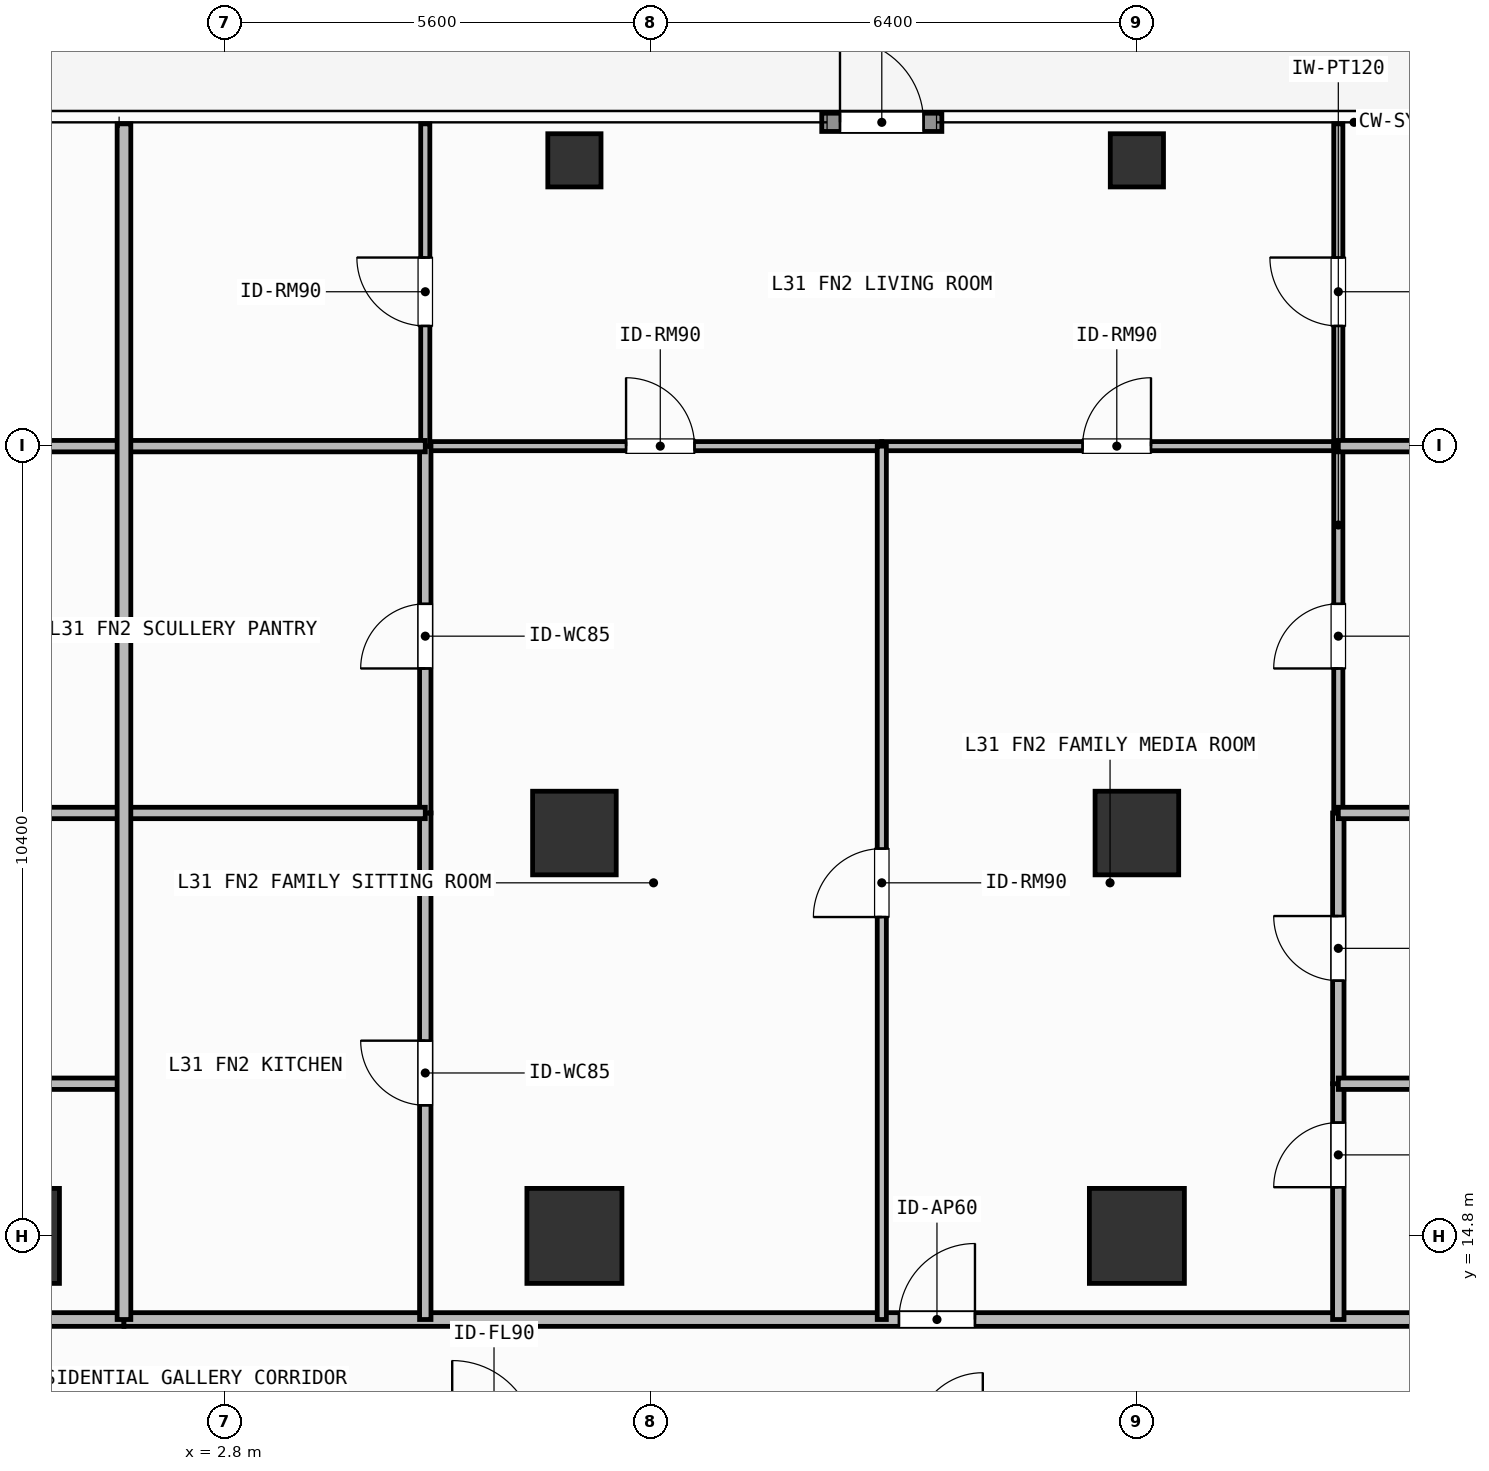
"""IFC4 building model, lengths in metres.
Left out: names, types, materials, properties, quantities, classifications, styles, units other than length and angle.
Written with IfcOpenShell. Run it as: python <this file> out.ifc"""

import sys

from ifc_helpers import new_model, si_unit, direction, frame, frame_2d, origin, origin_2d, place, context, subcontext, project, spatial, rectangle, hollow_rectangle, extrude, element, fill, save


model = new_model("IFC4")
c1 = context("Model", 3, precision=1e-05, world=origin(), true_north=direction((0.0, 1.0)))
c2 = subcontext(c1, "Body", "Model", "MODEL_VIEW")
j1 = project(units=[si_unit("LENGTHUNIT", "METRE"), si_unit("PLANEANGLEUNIT", "RADIAN")], contexts=[c1])
p1 = place(None, origin())
s1 = spatial("IfcSite", under=j1, at=p1, CompositionType="ELEMENT")
p2 = place(p1, origin())
s2 = spatial("IfcBuilding", under=s1, at=p2, CompositionType="ELEMENT")
p3 = place(p2, frame((0.0, 0.0, 125.1)))
s3 = spatial("IfcBuildingStorey", under=s2, at=p3, CompositionType="ELEMENT", Elevation=125.1)
for number, where, z_axis, x_axis in (
    (1, (0.0, 14.8, 0.0), (0.0, 0.0, 1.0), (1.0, 0.0, 0.0)),
    (2, (7.4, 14.8, 0.0), (0.0, 0.0, 1.0), (1.0, 0.0, 0.0)),
    (3, (14.8, 14.8, 0.0), (0.0, 0.0, 1.0), (1.0, 0.0, 0.0)),
):
    element("IfcColumn", number, at=place(p3, frame(where, z_axis=z_axis, x_axis=x_axis)), inside=s3, PredefinedType="COLUMN", context=c2, shape_type="SweptSolid", body=[
        extrude(rectangle(XDim=1.25, YDim=1.25, at=origin_2d()), origin(), (0.0, 0.0, 1.0), 3.9),
    ])
for number, where, z_axis, x_axis in (
    (4, (7.4, 20.1, 0.0), (0.0, 0.0, 1.0), (1.0, 0.0, 0.0)),
    (5, (14.8, 20.1, 0.0), (0.0, 0.0, 1.0), (1.0, 0.0, 0.0)),
):
    element("IfcColumn", number, at=place(p3, frame(where, z_axis=z_axis, x_axis=x_axis)), inside=s3, PredefinedType="COLUMN", context=c2, shape_type="SweptSolid", body=[
        extrude(rectangle(XDim=1.1, YDim=1.1, at=origin_2d()), origin(), (0.0, 0.0, 1.0), 3.9),
    ])
for number, where, z_axis, x_axis in (
    (6, (7.4, 28.95, 0.0), (0.0, 0.0, 1.0), (1.0, 0.0, 0.0)),
    (7, (14.8, 28.95, 0.0), (0.0, 0.0, 1.0), (1.0, 0.0, 0.0)),
):
    element("IfcColumn", number, at=place(p3, frame(where, z_axis=z_axis, x_axis=x_axis)), inside=s3, PredefinedType="COLUMN", context=c2, shape_type="SweptSolid", body=[
        extrude(hollow_rectangle(XDim=0.7, YDim=0.7, WallThickness=0.032, at=origin_2d()), origin(), (0.0, 0.0, 1.0), 3.9),
    ])
p4 = place(p3, frame((10.654, 29.45, 0.0), z_axis=(0.0, 0.0, 1.0), x_axis=(1.0, 0.0, 0.0)))
e8 = element("IfcWall", 8, at=p4, inside=s3, PredefinedType="SOLIDWALL", context=c2, shape_type="SweptSolid", body=[
    extrude(rectangle(XDim=1.58, YDim=0.24, at=frame_2d((0.79, 0.0))), origin(), (0.0, 0.0, 1.0), 3.68),
])
p5 = place(p4, frame((0.24, 0.0, 0.0)))
e9 = element("IfcOpeningElement", 9, at=p5, cuts=e8, PredefinedType="OPENING", context=c2, shape_type="SweptSolid", body=[
    extrude(rectangle(XDim=1.1, YDim=2.2, at=frame_2d((0.55, 1.1))), frame((0.0, 0.13, 0.0), z_axis=(0.0, -1.0, 0.0), x_axis=(1.0, 0.0, 0.0)), (0.0, 0.0, 1.0), 0.26),
])
p6 = place(p3, frame((-16.32, 13.7, 0.0), z_axis=(0.0, 0.0, 1.0), x_axis=(1.0, 0.0, 0.0)))
e10 = element("IfcWall", 10, at=p6, inside=s3, PredefinedType="PARTITIONING", context=c2, shape_type="SweptSolid", body=[
    extrude(rectangle(XDim=17.794, YDim=0.18, at=frame_2d((8.897, 0.0))), origin(), (0.0, 0.0, 1.0), 3.68),
])
p7 = place(p6, frame((9.65, 0.0, 0.0)))
e11 = element("IfcOpeningElement", 11, at=p7, cuts=e10, PredefinedType="OPENING", context=c2, shape_type="SweptSolid", body=[
    extrude(rectangle(XDim=1.0, YDim=2.2, at=frame_2d((0.5, 1.1))), frame((0.0, 0.1, 0.0), z_axis=(0.0, -1.0, 0.0), x_axis=(1.0, 0.0, 0.0)), (0.0, 0.0, 1.0), 0.2),
])
p8 = place(p3, frame((1.474, 13.7, 0.0), z_axis=(0.0, 0.0, 1.0), x_axis=(1.0, 0.0, 0.0)))
e12 = element("IfcWall", 12, at=p8, inside=s3, PredefinedType="PARTITIONING", context=c2, shape_type="SweptSolid", body=[
    extrude(rectangle(XDim=22.646, YDim=0.18, at=frame_2d((11.323, 0.0))), origin(), (0.0, 0.0, 1.0), 3.68),
])
p9 = place(p8, frame((10.196, 0.0, 0.0)))
e13 = element("IfcOpeningElement", 13, at=p9, cuts=e12, PredefinedType="OPENING", context=c2, shape_type="SweptSolid", body=[
    extrude(rectangle(XDim=1.0, YDim=2.2, at=frame_2d((0.5, 1.1))), frame((0.0, 0.1, 0.0), z_axis=(0.0, -1.0, 0.0), x_axis=(1.0, 0.0, 0.0)), (0.0, 0.0, 1.0), 0.2),
])
p10 = place(p3, frame((5.438, 25.19, 0.0), z_axis=(0.0, 0.0, 1.0), x_axis=(1.0, 0.0, 0.0)))
e14 = element("IfcWall", 14, at=p10, inside=s3, PredefinedType="PARTITIONING", context=c2, shape_type="SweptSolid", body=[
    extrude(rectangle(XDim=6.006, YDim=0.12, at=frame_2d((3.003, 0.0))), origin(), (0.0, 0.0, 1.0), 3.68),
])
p11 = place(p10, frame((2.642, 0.0, 0.0)))
e15 = element("IfcOpeningElement", 15, at=p11, cuts=e14, PredefinedType="OPENING", context=c2, shape_type="SweptSolid", body=[
    extrude(rectangle(XDim=0.9, YDim=2.1, at=frame_2d((0.45, 1.05))), frame((0.0, 0.07, 0.0), z_axis=(0.0, -1.0, 0.0), x_axis=(1.0, 0.0, 0.0)), (0.0, 0.0, 1.0), 0.14),
])
p12 = place(p3, frame((11.444, 25.19, 0.0), z_axis=(0.0, 0.0, 1.0), x_axis=(1.0, 0.0, 0.0)))
e16 = element("IfcWall", 16, at=p12, inside=s3, PredefinedType="PARTITIONING", context=c2, shape_type="SweptSolid", body=[
    extrude(rectangle(XDim=6.006, YDim=0.12, at=frame_2d((3.003, 0.0))), origin(), (0.0, 0.0, 1.0), 3.68),
])
p13 = place(p12, frame((2.642, 0.0, 0.0)))
e17 = element("IfcOpeningElement", 17, at=p13, cuts=e16, PredefinedType="OPENING", context=c2, shape_type="SweptSolid", body=[
    extrude(rectangle(XDim=0.9, YDim=2.1, at=frame_2d((0.45, 1.05))), frame((0.0, 0.07, 0.0), z_axis=(0.0, -1.0, 0.0), x_axis=(1.0, 0.0, 0.0)), (0.0, 0.0, 1.0), 0.14),
])
p14 = place(p3, frame((11.444, 13.7, 0.0), z_axis=(0.0, 0.0, 1.0), x_axis=(0.0, 1.0, 0.0)))
e18 = element("IfcWall", 18, at=p14, inside=s3, PredefinedType="PARTITIONING", context=c2, shape_type="SweptSolid", body=[
    extrude(rectangle(XDim=11.49, YDim=0.12, at=frame_2d((5.745, 0.0))), origin(), (0.0, 0.0, 1.0), 3.68),
])
p15 = place(p14, frame((5.295, 0.0, 0.0)))
e19 = element("IfcOpeningElement", 19, at=p15, cuts=e18, PredefinedType="OPENING", context=c2, shape_type="SweptSolid", body=[
    extrude(rectangle(XDim=0.9, YDim=2.1, at=frame_2d((0.45, 1.05))), frame((0.0, 0.07, 0.0), z_axis=(0.0, -1.0, 0.0), x_axis=(1.0, 0.0, 0.0)), (0.0, 0.0, 1.0), 0.14),
])
p16 = place(p3, frame((5.438, 13.7, 0.0), z_axis=(0.0, 0.0, 1.0), x_axis=(0.0, 1.0, 0.0)))
e20 = element("IfcWall", 20, at=p16, inside=s3, PredefinedType="PARTITIONING", context=c2, shape_type="SweptSolid", body=[
    extrude(rectangle(XDim=6.664, YDim=0.15, at=frame_2d((3.332, 0.0))), origin(), (0.0, 0.0, 1.0), 3.68),
])
p17 = place(p16, frame((2.818, 0.0, 0.0)))
e21 = element("IfcOpeningElement", 21, at=p17, cuts=e20, PredefinedType="OPENING", context=c2, shape_type="SweptSolid", body=[
    extrude(rectangle(XDim=0.85, YDim=2.1, at=frame_2d((0.425, 1.05))), frame((0.0, 0.085, 0.0), z_axis=(0.0, -1.0, 0.0), x_axis=(1.0, 0.0, 0.0)), (0.0, 0.0, 1.0), 0.17),
])
p18 = place(p3, frame((5.438, 20.364, 0.0), z_axis=(0.0, 0.0, 1.0), x_axis=(0.0, 1.0, 0.0)))
e22 = element("IfcWall", 22, at=p18, inside=s3, PredefinedType="PARTITIONING", context=c2, shape_type="SweptSolid", body=[
    extrude(rectangle(XDim=4.826, YDim=0.15, at=frame_2d((2.413, 0.0))), origin(), (0.0, 0.0, 1.0), 3.68),
])
p19 = place(p18, frame((1.901, 0.0, 0.0)))
e23 = element("IfcOpeningElement", 23, at=p19, cuts=e22, PredefinedType="OPENING", context=c2, shape_type="SweptSolid", body=[
    extrude(rectangle(XDim=0.85, YDim=2.1, at=frame_2d((0.425, 1.05))), frame((0.0, 0.085, 0.0), z_axis=(0.0, -1.0, 0.0), x_axis=(1.0, 0.0, 0.0)), (0.0, 0.0, 1.0), 0.17),
])
p20 = place(p3, frame((5.438, 25.19, 0.0), z_axis=(0.0, 0.0, 1.0), x_axis=(0.0, 1.0, 0.0)))
e24 = element("IfcWall", 24, at=p20, inside=s3, PredefinedType="PARTITIONING", context=c2, shape_type="SweptSolid", body=[
    extrude(rectangle(XDim=4.24, YDim=0.12, at=frame_2d((2.12, 0.0))), origin(), (0.0, 0.0, 1.0), 3.68),
])
p21 = place(p20, frame((1.581, 0.0, 0.0)))
e25 = element("IfcOpeningElement", 25, at=p21, cuts=e24, PredefinedType="OPENING", context=c2, shape_type="SweptSolid", body=[
    extrude(rectangle(XDim=0.9, YDim=2.1, at=frame_2d((0.45, 1.05))), frame((0.0, 0.07, 0.0), z_axis=(0.0, -1.0, 0.0), x_axis=(1.0, 0.0, 0.0)), (0.0, 0.0, 1.0), 0.14),
])
p22 = place(p3, frame((17.45, 13.7, 0.0), z_axis=(0.0, 0.0, 1.0), x_axis=(0.0, 1.0, 0.0)))
e26 = element("IfcWall", 26, at=p22, inside=s3, PredefinedType="PARTITIONING", context=c2, shape_type="SweptSolid", body=[
    extrude(rectangle(XDim=3.102, YDim=0.15, at=frame_2d((1.551, 0.0))), origin(), (0.0, 0.0, 1.0), 3.68),
])
p23 = place(p22, frame((1.741, 0.0, 0.0)))
e27 = element("IfcOpeningElement", 27, at=p23, cuts=e26, PredefinedType="OPENING", context=c2, shape_type="SweptSolid", body=[
    extrude(rectangle(XDim=0.85, YDim=2.1, at=frame_2d((0.425, 1.05))), frame((0.0, 0.085, 0.0), z_axis=(0.0, -1.0, 0.0), x_axis=(1.0, 0.0, 0.0)), (0.0, 0.0, 1.0), 0.17),
])
p24 = place(p3, frame((17.45, 16.802, 0.0), z_axis=(0.0, 0.0, 1.0), x_axis=(0.0, 1.0, 0.0)))
e28 = element("IfcWall", 28, at=p24, inside=s3, PredefinedType="PARTITIONING", context=c2, shape_type="SweptSolid", body=[
    extrude(rectangle(XDim=3.562, YDim=0.15, at=frame_2d((1.781, 0.0))), origin(), (0.0, 0.0, 1.0), 3.68),
])
p25 = place(p24, frame((1.356, 0.0, 0.0)))
e29 = element("IfcOpeningElement", 29, at=p25, cuts=e28, PredefinedType="OPENING", context=c2, shape_type="SweptSolid", body=[
    extrude(rectangle(XDim=0.85, YDim=2.1, at=frame_2d((0.425, 1.05))), frame((0.0, 0.085, 0.0), z_axis=(0.0, -1.0, 0.0), x_axis=(1.0, 0.0, 0.0)), (0.0, 0.0, 1.0), 0.17),
])
p26 = place(p3, frame((17.45, 20.364, 0.0), z_axis=(0.0, 0.0, 1.0), x_axis=(0.0, 1.0, 0.0)))
e30 = element("IfcWall", 30, at=p26, inside=s3, PredefinedType="PARTITIONING", context=c2, shape_type="SweptSolid", body=[
    extrude(rectangle(XDim=4.826, YDim=0.12, at=frame_2d((2.413, 0.0))), origin(), (0.0, 0.0, 1.0), 3.68),
])
p27 = place(p26, frame((1.901, 0.0, 0.0)))
e31 = element("IfcOpeningElement", 31, at=p27, cuts=e30, PredefinedType="OPENING", context=c2, shape_type="SweptSolid", body=[
    extrude(rectangle(XDim=0.85, YDim=2.1, at=frame_2d((0.425, 1.05))), frame((0.0, 0.07, 0.0), z_axis=(0.0, -1.0, 0.0), x_axis=(1.0, 0.0, 0.0)), (0.0, 0.0, 1.0), 0.14),
])
p28 = place(p3, frame((17.45, 25.19, 0.0), z_axis=(0.0, 0.0, 1.0), x_axis=(0.0, 1.0, 0.0)))
e32 = element("IfcWall", 32, at=p28, inside=s3, PredefinedType="PARTITIONING", context=c2, shape_type="SweptSolid", body=[
    extrude(rectangle(XDim=4.24, YDim=0.12, at=frame_2d((2.12, 0.0))), origin(), (0.0, 0.0, 1.0), 3.68),
])
p29 = place(p28, frame((1.581, 0.0, 0.0)))
e33 = element("IfcOpeningElement", 33, at=p29, cuts=e32, PredefinedType="OPENING", context=c2, shape_type="SweptSolid", body=[
    extrude(rectangle(XDim=0.9, YDim=2.1, at=frame_2d((0.45, 1.05))), frame((0.0, 0.07, 0.0), z_axis=(0.0, -1.0, 0.0), x_axis=(1.0, 0.0, 0.0)), (0.0, 0.0, 1.0), 0.14),
])
p30 = place(p3, frame((-4.078, 16.802, 0.0), z_axis=(0.0, 0.0, 1.0), x_axis=(1.0, 0.0, 0.0)))
e34 = element("IfcWall", 34, at=p30, inside=s3, PredefinedType="PARTITIONING", context=c2, shape_type="SweptSolid", body=[
    extrude(rectangle(XDim=5.552, YDim=0.15, at=frame_2d((2.776, 0.0))), origin(), (0.0, 0.0, 1.0), 3.68),
])
p31 = place(p3, frame((-4.078, 20.364, 0.0), z_axis=(0.0, 0.0, 1.0), x_axis=(1.0, 0.0, 0.0)))
e35 = element("IfcWall", 35, at=p31, inside=s3, PredefinedType="PARTITIONING", context=c2, shape_type="SweptSolid", body=[
    extrude(rectangle(XDim=5.552, YDim=0.15, at=frame_2d((2.776, 0.0))), origin(), (0.0, 0.0, 1.0), 3.082),
])
p32 = place(p3, frame((-4.078, 25.19, 0.0), z_axis=(0.0, 0.0, 1.0), x_axis=(1.0, 0.0, 0.0)))
e36 = element("IfcWall", 36, at=p32, inside=s3, PredefinedType="PARTITIONING", context=c2, shape_type="SweptSolid", body=[
    extrude(rectangle(XDim=5.552, YDim=0.15, at=frame_2d((2.776, 0.0))), origin(), (0.0, 0.0, 1.0), 3.68),
])
p33 = place(p3, frame((1.474, 20.364, 0.0), z_axis=(0.0, 0.0, 1.0), x_axis=(1.0, 0.0, 0.0)))
e37 = element("IfcWall", 37, at=p33, inside=s3, PredefinedType="PARTITIONING", context=c2, shape_type="SweptSolid", body=[
    extrude(rectangle(XDim=3.964, YDim=0.15, at=frame_2d((1.982, 0.0))), origin(), (0.0, 0.0, 1.0), 3.082),
])
p34 = place(p3, frame((1.474, 25.19, 0.0), z_axis=(0.0, 0.0, 1.0), x_axis=(1.0, 0.0, 0.0)))
e38 = element("IfcWall", 38, at=p34, inside=s3, PredefinedType="PARTITIONING", context=c2, shape_type="SweptSolid", body=[
    extrude(rectangle(XDim=3.964, YDim=0.15, at=frame_2d((1.982, 0.0))), origin(), (0.0, 0.0, 1.0), 3.68),
])
for number, where, z_axis, x_axis in (
    (39, (17.45, 16.802, 0.0), (0.0, 0.0, 1.0), (1.0, 0.0, 0.0)),
    (40, (17.45, 20.364, 0.0), (0.0, 0.0, 1.0), (1.0, 0.0, 0.0)),
    (41, (17.45, 25.19, 0.0), (0.0, 0.0, 1.0), (1.0, 0.0, 0.0)),
):
    element("IfcWall", number, at=place(p3, frame(where, z_axis=z_axis, x_axis=x_axis)), inside=s3, PredefinedType="PARTITIONING", context=c2, shape_type="SweptSolid", body=[
        extrude(rectangle(XDim=6.67, YDim=0.15, at=frame_2d((3.335, 0.0))), origin(), (0.0, 0.0, 1.0), 3.68),
    ])
p35 = place(p3, frame((1.474, 13.7, 0.0), z_axis=(0.0, 0.0, 1.0), x_axis=(0.0, 1.0, 0.0)))
e42 = element("IfcWall", 42, at=p35, inside=s3, PredefinedType="PARTITIONING", context=c2, shape_type="SweptSolid", body=[
    extrude(rectangle(XDim=15.73, YDim=0.18, at=frame_2d((7.865, 0.0))), origin(), (0.0, 0.0, 1.0), 3.68),
])
p36 = place(p5, origin())
e43 = element("IfcDoor", 43, at=p36, inside=s3, OperationType="SINGLE_SWING_LEFT", PredefinedType="DOOR", context=c2, shape_type="SweptSolid", body=[
    extrude(rectangle(XDim=1.1, YDim=2.2, at=frame_2d((0.55, 1.1))), frame((0.0, 0.025, 0.0), z_axis=(0.0, -1.0, 0.0), x_axis=(1.0, 0.0, 0.0)), (0.0, 0.0, 1.0), 0.05),
])
fill(e9, e43)
p37 = place(p9, origin())
e44 = element("IfcDoor", 44, at=p37, inside=s3, OperationType="SINGLE_SWING_RIGHT", PredefinedType="DOOR", context=c2, shape_type="SweptSolid", body=[
    extrude(rectangle(XDim=1.0, YDim=2.2, at=frame_2d((0.5, 1.1))), frame((0.0, 0.025, 0.0), z_axis=(0.0, -1.0, 0.0), x_axis=(1.0, 0.0, 0.0)), (0.0, 0.0, 1.0), 0.05),
])
fill(e13, e44)
p38 = place(p11, origin())
e45 = element("IfcDoor", 45, at=p38, inside=s3, OperationType="SINGLE_SWING_LEFT", PredefinedType="DOOR", context=c2, shape_type="SweptSolid", body=[
    extrude(rectangle(XDim=0.9, YDim=2.1, at=frame_2d((0.45, 1.05))), frame((0.0, 0.025, 0.0), z_axis=(0.0, -1.0, 0.0), x_axis=(1.0, 0.0, 0.0)), (0.0, 0.0, 1.0), 0.05),
])
fill(e15, e45)
p39 = place(p13, origin())
e46 = element("IfcDoor", 46, at=p39, inside=s3, OperationType="SINGLE_SWING_RIGHT", PredefinedType="DOOR", context=c2, shape_type="SweptSolid", body=[
    extrude(rectangle(XDim=0.9, YDim=2.1, at=frame_2d((0.45, 1.05))), frame((0.0, 0.025, 0.0), z_axis=(0.0, -1.0, 0.0), x_axis=(1.0, 0.0, 0.0)), (0.0, 0.0, 1.0), 0.05),
])
fill(e17, e46)
p40 = place(p15, origin())
e47 = element("IfcDoor", 47, at=p40, inside=s3, OperationType="SINGLE_SWING_LEFT", PredefinedType="DOOR", context=c2, shape_type="SweptSolid", body=[
    extrude(rectangle(XDim=0.9, YDim=2.1, at=frame_2d((0.45, 1.05))), frame((0.0, 0.025, 0.0), z_axis=(0.0, -1.0, 0.0), x_axis=(1.0, 0.0, 0.0)), (0.0, 0.0, 1.0), 0.05),
])
fill(e19, e47)
p41 = place(p17, origin())
e48 = element("IfcDoor", 48, at=p41, inside=s3, OperationType="SINGLE_SWING_RIGHT", PredefinedType="DOOR", context=c2, shape_type="SweptSolid", body=[
    extrude(rectangle(XDim=0.85, YDim=2.1, at=frame_2d((0.425, 1.05))), frame((0.0, 0.025, 0.0), z_axis=(0.0, -1.0, 0.0), x_axis=(1.0, 0.0, 0.0)), (0.0, 0.0, 1.0), 0.05),
])
fill(e21, e48)
p42 = place(p19, origin())
e49 = element("IfcDoor", 49, at=p42, inside=s3, OperationType="SINGLE_SWING_LEFT", PredefinedType="DOOR", context=c2, shape_type="SweptSolid", body=[
    extrude(rectangle(XDim=0.85, YDim=2.1, at=frame_2d((0.425, 1.05))), frame((0.0, 0.025, 0.0), z_axis=(0.0, -1.0, 0.0), x_axis=(1.0, 0.0, 0.0)), (0.0, 0.0, 1.0), 0.05),
])
fill(e23, e49)
p43 = place(p21, origin())
e50 = element("IfcDoor", 50, at=p43, inside=s3, OperationType="SINGLE_SWING_RIGHT", PredefinedType="DOOR", context=c2, shape_type="SweptSolid", body=[
    extrude(rectangle(XDim=0.9, YDim=2.1, at=frame_2d((0.45, 1.05))), frame((0.0, 0.025, 0.0), z_axis=(0.0, -1.0, 0.0), x_axis=(1.0, 0.0, 0.0)), (0.0, 0.0, 1.0), 0.05),
])
fill(e25, e50)
p44 = place(p23, origin())
e51 = element("IfcDoor", 51, at=p44, inside=s3, OperationType="SINGLE_SWING_LEFT", PredefinedType="DOOR", context=c2, shape_type="SweptSolid", body=[
    extrude(rectangle(XDim=0.85, YDim=2.1, at=frame_2d((0.425, 1.05))), frame((0.0, 0.025, 0.0), z_axis=(0.0, -1.0, 0.0), x_axis=(1.0, 0.0, 0.0)), (0.0, 0.0, 1.0), 0.05),
])
fill(e27, e51)
p45 = place(p25, origin())
e52 = element("IfcDoor", 52, at=p45, inside=s3, OperationType="SINGLE_SWING_RIGHT", PredefinedType="DOOR", context=c2, shape_type="SweptSolid", body=[
    extrude(rectangle(XDim=0.85, YDim=2.1, at=frame_2d((0.425, 1.05))), frame((0.0, 0.025, 0.0), z_axis=(0.0, -1.0, 0.0), x_axis=(1.0, 0.0, 0.0)), (0.0, 0.0, 1.0), 0.05),
])
fill(e29, e52)
p46 = place(p27, origin())
e53 = element("IfcDoor", 53, at=p46, inside=s3, OperationType="SINGLE_SWING_LEFT", PredefinedType="DOOR", context=c2, shape_type="SweptSolid", body=[
    extrude(rectangle(XDim=0.85, YDim=2.1, at=frame_2d((0.425, 1.05))), frame((0.0, 0.025, 0.0), z_axis=(0.0, -1.0, 0.0), x_axis=(1.0, 0.0, 0.0)), (0.0, 0.0, 1.0), 0.05),
])
fill(e31, e53)
p47 = place(p29, origin())
e54 = element("IfcDoor", 54, at=p47, inside=s3, OperationType="SINGLE_SWING_RIGHT", PredefinedType="DOOR", context=c2, shape_type="SweptSolid", body=[
    extrude(rectangle(XDim=0.9, YDim=2.1, at=frame_2d((0.45, 1.05))), frame((0.0, 0.025, 0.0), z_axis=(0.0, -1.0, 0.0), x_axis=(1.0, 0.0, 0.0)), (0.0, 0.0, 1.0), 0.05),
])
fill(e33, e54)
save(model, sys.argv[1])
